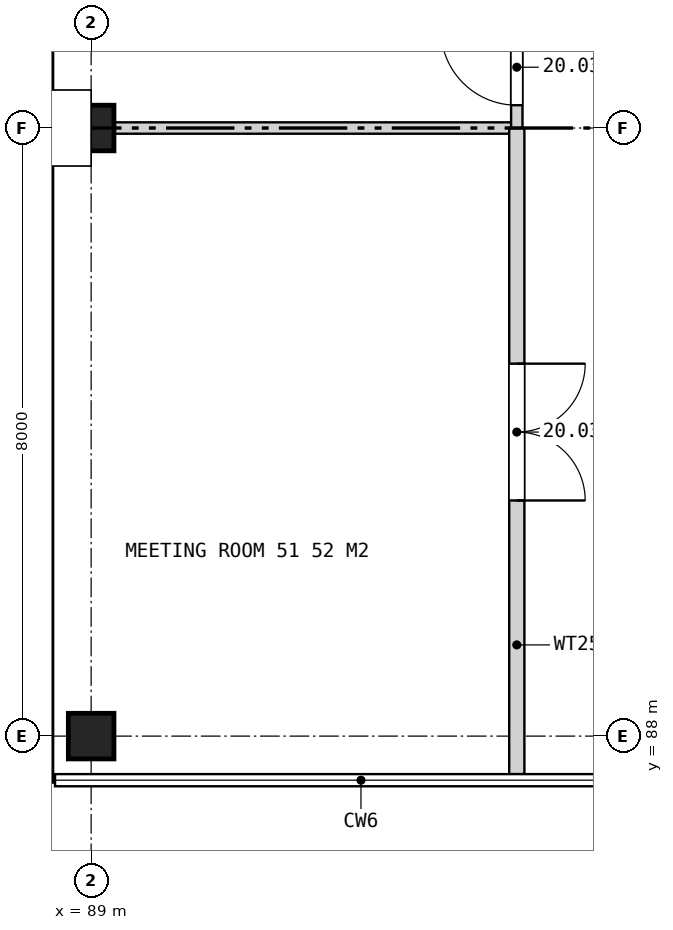
"""IFC4 building model, lengths in metres.
Left out: names, types, materials, properties, quantities, classifications, styles, units other than length and angle.
Written with IfcOpenShell. Run it as: python <this file> out.ifc"""

import sys

from ifc_helpers import new_model, si_unit, direction, frame, frame_2d, origin, origin_2d, place, context, subcontext, project, spatial, rectangle, extrude, element, fill, save


model = new_model("IFC4")
c1 = context("Model", 3, precision=1e-05, world=origin(), true_north=direction((0.0, 1.0)))
c2 = subcontext(c1, "Body", "Model", "MODEL_VIEW")
j1 = project(units=[si_unit("LENGTHUNIT", "METRE"), si_unit("PLANEANGLEUNIT", "RADIAN")], contexts=[c1])
p1 = place(None, origin())
s1 = spatial("IfcSite", under=j1, at=p1, CompositionType="ELEMENT")
p2 = place(p1, origin())
s2 = spatial("IfcBuilding", under=s1, at=p2, CompositionType="ELEMENT")
p3 = place(p2, frame((0.0, 0.0, 101.6)))
s3 = spatial("IfcBuildingStorey", under=s2, at=p3, CompositionType="ELEMENT", Elevation=101.6)
for number, where, z_axis, x_axis in (
    (1, (89.0, 88.0, 0.0), (0.0, 0.0, 1.0), (1.0, 0.0, 0.0)),
    (2, (89.0, 96.0, 0.0), (0.0, 0.0, 1.0), (1.0, 0.0, 0.0)),
):
    element("IfcColumn", number, at=place(p3, frame(where, z_axis=z_axis, x_axis=x_axis)), inside=s3, PredefinedType="COLUMN", context=c2, shape_type="SweptSolid", body=[
        extrude(rectangle(XDim=0.6, YDim=0.6, at=origin_2d()), origin(), (0.0, 0.0, 1.0), 3.7),
    ])
p4 = place(p3, frame((89.3, 96.0, 0.0), z_axis=(0.0, 0.0, 1.0), x_axis=(1.0, 0.0, 0.0)))
e3 = element("IfcWall", 3, at=p4, inside=s3, PredefinedType="PARTITIONING", context=c2, shape_type="SweptSolid", body=[
    extrude(rectangle(XDim=5.225, YDim=0.15, at=frame_2d((2.612, 0.0))), origin(), (0.0, 0.0, 1.0), 2.755),
])
p5 = place(p3, frame((94.6, 87.5, 0.0), z_axis=(0.0, 0.0, 1.0), x_axis=(0.0, 1.0, 0.0)))
e4 = element("IfcWall", 4, at=p5, inside=s3, PredefinedType="PARTITIONING", context=c2, shape_type="SweptSolid", body=[
    extrude(rectangle(XDim=8.5, YDim=0.2, at=frame_2d((4.25, 0.0))), origin(), (0.0, 0.0, 1.0), 2.755),
])
p6 = place(p5, frame((3.6, 0.0, 0.0)))
e5 = element("IfcOpeningElement", 5, at=p6, cuts=e4, PredefinedType="OPENING", context=c2, shape_type="SweptSolid", body=[
    extrude(rectangle(XDim=1.8, YDim=2.4, at=frame_2d((0.9, 1.2))), frame((0.0, 0.11, 0.0), z_axis=(0.0, -1.0, 0.0), x_axis=(1.0, 0.0, 0.0)), (0.0, 0.0, 1.0), 0.22),
])
p7 = place(p3, frame((94.6, 96.0, 0.0), z_axis=(0.0, 0.0, 1.0), x_axis=(0.0, 1.0, 0.0)))
e6 = element("IfcWall", 6, at=p7, inside=s3, PredefinedType="PARTITIONING", context=c2, shape_type="SweptSolid", body=[
    extrude(rectangle(XDim=8.0, YDim=0.15, at=frame_2d((4.0, 0.0))), origin(), (0.0, 0.0, 1.0), 2.755),
])
p8 = place(p7, frame((0.3, 0.0, 0.0)))
e7 = element("IfcOpeningElement", 7, at=p8, cuts=e6, PredefinedType="OPENING", context=c2, shape_type="SweptSolid", body=[
    extrude(rectangle(XDim=1.0, YDim=2.1, at=frame_2d((0.5, 1.05))), frame((0.0, 0.085, 0.0), z_axis=(0.0, -1.0, 0.0), x_axis=(1.0, 0.0, 0.0)), (0.0, 0.0, 1.0), 0.17),
])
p9 = place(p7, frame((6.7, 0.0, 0.0)))
e8 = element("IfcOpeningElement", 8, at=p9, cuts=e6, PredefinedType="OPENING", context=c2, shape_type="SweptSolid", body=[
    extrude(rectangle(XDim=1.0, YDim=2.1, at=frame_2d((0.5, 1.05))), frame((0.0, 0.085, 0.0), z_axis=(0.0, -1.0, 0.0), x_axis=(1.0, 0.0, 0.0)), (0.0, 0.0, 1.0), 0.17),
])
p10 = place(p6, frame((1.8, 0.0, 0.0), z_axis=(0.0, 0.0, 1.0), x_axis=(-1.0, 0.0, 0.0)))
e9 = element("IfcDoor", 9, at=p10, inside=s3, OperationType="DOUBLE_DOOR_SINGLE_SWING", PredefinedType="DOOR", context=c2, shape_type="SweptSolid", body=[
    extrude(rectangle(XDim=1.8, YDim=2.4, at=frame_2d((0.9, 1.2))), frame((0.0, 0.025, 0.0), z_axis=(0.0, -1.0, 0.0), x_axis=(1.0, 0.0, 0.0)), (0.0, 0.0, 1.0), 0.05),
])
fill(e5, e9)
p11 = place(p8, origin())
e10 = element("IfcDoor", 10, at=p11, inside=s3, OperationType="SINGLE_SWING_RIGHT", PredefinedType="DOOR", context=c2, shape_type="SweptSolid", body=[
    extrude(rectangle(XDim=1.0, YDim=2.1, at=frame_2d((0.5, 1.05))), frame((0.0, 0.025, 0.0), z_axis=(0.0, -1.0, 0.0), x_axis=(1.0, 0.0, 0.0)), (0.0, 0.0, 1.0), 0.05),
])
fill(e7, e10)
save(model, sys.argv[1])
